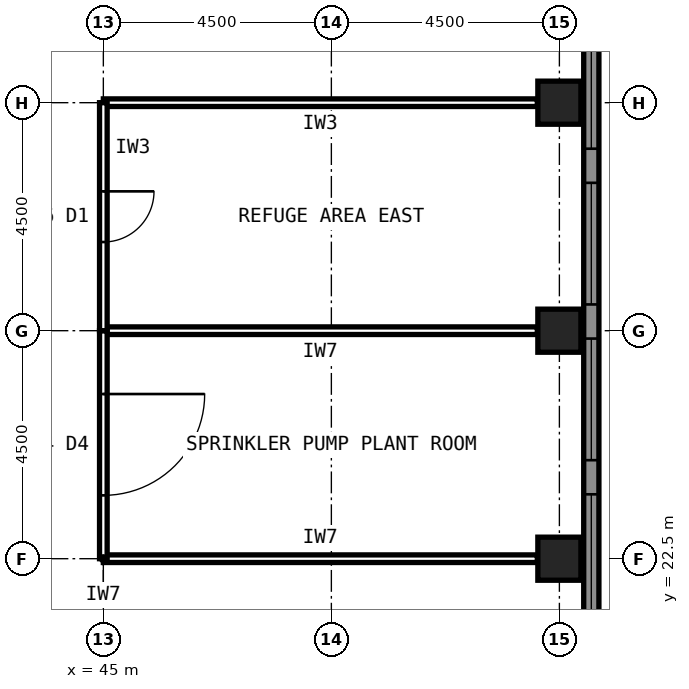
"""IFC4 building model, lengths in metres.
Left out: names, types, materials, properties, quantities, classifications, styles, units other than length and angle.
Written with IfcOpenShell. Run it as: python <this file> out.ifc"""

import sys

from ifc_helpers import new_model, si_unit, direction, frame, frame_2d, origin, origin_2d, place, context, subcontext, project, spatial, rectangle, hollow_rectangle, extrude, element, fill, save


model = new_model("IFC4")
c1 = context("Model", 3, precision=1e-05, world=origin(), true_north=direction((0.0, 1.0)))
c2 = subcontext(c1, "Body", "Model", "MODEL_VIEW")
j1 = project(units=[si_unit("LENGTHUNIT", "METRE"), si_unit("PLANEANGLEUNIT", "RADIAN")], contexts=[c1])
p1 = place(None, origin())
s1 = spatial("IfcSite", under=j1, at=p1, CompositionType="ELEMENT")
p2 = place(p1, origin())
s2 = spatial("IfcBuilding", under=s1, at=p2, CompositionType="ELEMENT")
p3 = place(p2, frame((0.0, 0.0, 104.6)))
s3 = spatial("IfcBuildingStorey", under=s2, at=p3, CompositionType="ELEMENT", Elevation=104.6)
for number, where, z_axis, x_axis in (
    (1, (54.0, 22.5, 0.0), (0.0, 0.0, 1.0), (1.0, 0.0, 0.0)),
    (2, (54.0, 27.0, 0.0), (0.0, 0.0, 1.0), (1.0, 0.0, 0.0)),
    (3, (54.0, 31.5, 0.0), (0.0, 0.0, 1.0), (1.0, 0.0, 0.0)),
):
    element("IfcColumn", number, at=place(p3, frame(where, z_axis=z_axis, x_axis=x_axis)), inside=s3, PredefinedType="COLUMN", context=c2, shape_type="SweptSolid", body=[
        extrude(hollow_rectangle(XDim=0.85, YDim=0.85, WallThickness=0.05, at=origin_2d()), origin(), (0.0, 0.0, 1.0), 6.0),
    ])
p4 = place(p3, frame((54.63, 36.402, 0.0), z_axis=(0.0, 0.0, 1.0), x_axis=(0.0, -1.0, 0.0)))
e4 = element("IfcWall", 4, at=p4, inside=s3, PredefinedType="SOLIDWALL", context=c2, shape_type="SweptSolid", body=[
    extrude(rectangle(XDim=27.663, YDim=0.3, at=frame_2d((13.832, 0.0))), origin(), (0.0, 0.0, 1.0), 6.0),
])
p5 = place(p4, frame((0.337, 0.0, 1.2)))
e5 = element("IfcOpeningElement", 5, at=p5, cuts=e4, PredefinedType="OPENING", context=c2, shape_type="SweptSolid", body=[
    extrude(rectangle(XDim=2.4, YDim=3.0, at=frame_2d((1.2, 1.5))), frame((0.0, 0.16, 0.0), z_axis=(0.0, -1.0, 0.0), x_axis=(1.0, 0.0, 0.0)), (0.0, 0.0, 1.0), 0.32),
])
p6 = place(p4, frame((3.411, 0.0, 1.2)))
e6 = element("IfcOpeningElement", 6, at=p6, cuts=e4, PredefinedType="OPENING", context=c2, shape_type="SweptSolid", body=[
    extrude(rectangle(XDim=2.4, YDim=3.0, at=frame_2d((1.2, 1.5))), frame((0.0, 0.16, 0.0), z_axis=(0.0, -1.0, 0.0), x_axis=(1.0, 0.0, 0.0)), (0.0, 0.0, 1.0), 0.32),
])
p7 = place(p4, frame((6.484, 0.0, 1.2)))
e7 = element("IfcOpeningElement", 7, at=p7, cuts=e4, PredefinedType="OPENING", context=c2, shape_type="SweptSolid", body=[
    extrude(rectangle(XDim=2.4, YDim=3.0, at=frame_2d((1.2, 1.5))), frame((0.0, 0.16, 0.0), z_axis=(0.0, -1.0, 0.0), x_axis=(1.0, 0.0, 0.0)), (0.0, 0.0, 1.0), 0.32),
])
p8 = place(p4, frame((9.558, 0.0, 1.2)))
e8 = element("IfcOpeningElement", 8, at=p8, cuts=e4, PredefinedType="OPENING", context=c2, shape_type="SweptSolid", body=[
    extrude(rectangle(XDim=2.4, YDim=3.0, at=frame_2d((1.2, 1.5))), frame((0.0, 0.16, 0.0), z_axis=(0.0, -1.0, 0.0), x_axis=(1.0, 0.0, 0.0)), (0.0, 0.0, 1.0), 0.32),
])
p9 = place(p4, frame((12.632, 0.0, 1.2)))
e9 = element("IfcOpeningElement", 9, at=p9, cuts=e4, PredefinedType="OPENING", context=c2, shape_type="SweptSolid", body=[
    extrude(rectangle(XDim=2.4, YDim=3.0, at=frame_2d((1.2, 1.5))), frame((0.0, 0.16, 0.0), z_axis=(0.0, -1.0, 0.0), x_axis=(1.0, 0.0, 0.0)), (0.0, 0.0, 1.0), 0.32),
])
p10 = place(p4, frame((15.705, 0.0, 1.2)))
e10 = element("IfcOpeningElement", 10, at=p10, cuts=e4, PredefinedType="OPENING", context=c2, shape_type="SweptSolid", body=[
    extrude(rectangle(XDim=2.4, YDim=3.0, at=frame_2d((1.2, 1.5))), frame((0.0, 0.16, 0.0), z_axis=(0.0, -1.0, 0.0), x_axis=(1.0, 0.0, 0.0)), (0.0, 0.0, 1.0), 0.32),
])
p11 = place(p4, frame((18.779, 0.0, 1.2)))
e11 = element("IfcOpeningElement", 11, at=p11, cuts=e4, PredefinedType="OPENING", context=c2, shape_type="SweptSolid", body=[
    extrude(rectangle(XDim=2.4, YDim=3.0, at=frame_2d((1.2, 1.5))), frame((0.0, 0.16, 0.0), z_axis=(0.0, -1.0, 0.0), x_axis=(1.0, 0.0, 0.0)), (0.0, 0.0, 1.0), 0.32),
])
p12 = place(p4, frame((21.853, 0.0, 1.2)))
e12 = element("IfcOpeningElement", 12, at=p12, cuts=e4, PredefinedType="OPENING", context=c2, shape_type="SweptSolid", body=[
    extrude(rectangle(XDim=2.4, YDim=3.0, at=frame_2d((1.2, 1.5))), frame((0.0, 0.16, 0.0), z_axis=(0.0, -1.0, 0.0), x_axis=(1.0, 0.0, 0.0)), (0.0, 0.0, 1.0), 0.32),
])
p13 = place(p4, frame((24.927, 0.0, 1.2)))
e13 = element("IfcOpeningElement", 13, at=p13, cuts=e4, PredefinedType="OPENING", context=c2, shape_type="SweptSolid", body=[
    extrude(rectangle(XDim=2.4, YDim=3.0, at=frame_2d((1.2, 1.5))), frame((0.0, 0.16, 0.0), z_axis=(0.0, -1.0, 0.0), x_axis=(1.0, 0.0, 0.0)), (0.0, 0.0, 1.0), 0.32),
])
for number, where, z_axis, x_axis in (
    (14, (45.0, 22.5, 0.0), (0.0, 0.0, 1.0), (1.0, 0.0, 0.0)),
    (15, (53.565, 27.0, 0.0), (0.0, 0.0, 1.0), (-1.0, 0.0, 0.0)),
):
    element("IfcWall", number, at=place(p3, frame(where, z_axis=z_axis, x_axis=x_axis)), inside=s3, PredefinedType="PARTITIONING", context=c2, shape_type="SweptSolid", body=[
        extrude(rectangle(XDim=8.565, YDim=0.15, at=frame_2d((4.282, 0.0))), origin(), (0.0, 0.0, 1.0), 4.72),
    ])
p14 = place(p3, frame((45.0, 27.0, 0.0), z_axis=(0.0, 0.0, 1.0), x_axis=(0.0, -1.0, 0.0)))
e16 = element("IfcWall", 16, at=p14, inside=s3, PredefinedType="PARTITIONING", context=c2, shape_type="SweptSolid", body=[
    extrude(rectangle(XDim=4.5, YDim=0.15, at=frame_2d((2.25, 0.0))), origin(), (0.0, 0.0, 1.0), 5.82),
])
p15 = place(p14, frame((1.25, 0.0, 0.0)))
e17 = element("IfcOpeningElement", 17, at=p15, cuts=e16, PredefinedType="OPENING", context=c2, shape_type="SweptSolid", body=[
    extrude(rectangle(XDim=2.0, YDim=2.4, at=frame_2d((1.0, 1.2))), frame((0.0, 0.085, 0.0), z_axis=(0.0, -1.0, 0.0), x_axis=(1.0, 0.0, 0.0)), (0.0, 0.0, 1.0), 0.17),
])
p16 = place(p3, frame((53.565, 31.5, 0.0), z_axis=(0.0, 0.0, 1.0), x_axis=(-1.0, 0.0, 0.0)))
e18 = element("IfcWall", 18, at=p16, inside=s3, PredefinedType="PARTITIONING", context=c2, shape_type="SweptSolid", body=[
    extrude(rectangle(XDim=8.565, YDim=0.15, at=frame_2d((4.282, 0.0))), origin(), (0.0, 0.0, 1.0), 4.72),
])
p17 = place(p3, frame((45.0, 31.5, 0.0), z_axis=(0.0, 0.0, 1.0), x_axis=(0.0, -1.0, 0.0)))
e19 = element("IfcWall", 19, at=p17, inside=s3, PredefinedType="PARTITIONING", context=c2, shape_type="SweptSolid", body=[
    extrude(rectangle(XDim=4.5, YDim=0.15, at=frame_2d((2.25, 0.0))), origin(), (0.0, 0.0, 1.0), 5.82),
])
p18 = place(p17, frame((1.75, 0.0, 0.0)))
e20 = element("IfcOpeningElement", 20, at=p18, cuts=e19, PredefinedType="OPENING", context=c2, shape_type="SweptSolid", body=[
    extrude(rectangle(XDim=1.0, YDim=2.1, at=frame_2d((0.5, 1.05))), frame((0.0, 0.085, 0.0), z_axis=(0.0, -1.0, 0.0), x_axis=(1.0, 0.0, 0.0)), (0.0, 0.0, 1.0), 0.17),
])
p19 = place(p6, origin())
e21 = element("IfcWindow", 21, at=p19, inside=s3, PartitioningType="SINGLE_PANEL", PredefinedType="USERDEFINED", context=c2, shape_type="SweptSolid", body=[
    extrude(rectangle(XDim=2.4, YDim=3.0, at=frame_2d((1.2, 1.5))), frame((0.0, 0.03, 0.0), z_axis=(0.0, -1.0, 0.0), x_axis=(1.0, 0.0, 0.0)), (0.0, 0.0, 1.0), 0.06),
])
fill(e6, e21)
p20 = place(p7, origin())
e22 = element("IfcWindow", 22, at=p20, inside=s3, PartitioningType="SINGLE_PANEL", PredefinedType="USERDEFINED", context=c2, shape_type="SweptSolid", body=[
    extrude(rectangle(XDim=2.4, YDim=3.0, at=frame_2d((1.2, 1.5))), frame((0.0, 0.03, 0.0), z_axis=(0.0, -1.0, 0.0), x_axis=(1.0, 0.0, 0.0)), (0.0, 0.0, 1.0), 0.06),
])
fill(e7, e22)
p21 = place(p8, origin())
e23 = element("IfcWindow", 23, at=p21, inside=s3, PartitioningType="SINGLE_PANEL", PredefinedType="USERDEFINED", context=c2, shape_type="SweptSolid", body=[
    extrude(rectangle(XDim=2.4, YDim=3.0, at=frame_2d((1.2, 1.5))), frame((0.0, 0.03, 0.0), z_axis=(0.0, -1.0, 0.0), x_axis=(1.0, 0.0, 0.0)), (0.0, 0.0, 1.0), 0.06),
])
fill(e8, e23)
p22 = place(p9, origin())
e24 = element("IfcWindow", 24, at=p22, inside=s3, PartitioningType="SINGLE_PANEL", PredefinedType="USERDEFINED", context=c2, shape_type="SweptSolid", body=[
    extrude(rectangle(XDim=2.4, YDim=3.0, at=frame_2d((1.2, 1.5))), frame((0.0, 0.03, 0.0), z_axis=(0.0, -1.0, 0.0), x_axis=(1.0, 0.0, 0.0)), (0.0, 0.0, 1.0), 0.06),
])
fill(e9, e24)
p23 = place(p15, origin())
e25 = element("IfcDoor", 25, at=p23, inside=s3, OperationType="SINGLE_SWING_LEFT", PredefinedType="DOOR", context=c2, shape_type="SweptSolid", body=[
    extrude(rectangle(XDim=2.0, YDim=2.4, at=frame_2d((1.0, 1.2))), frame((0.0, 0.025, 0.0), z_axis=(0.0, -1.0, 0.0), x_axis=(1.0, 0.0, 0.0)), (0.0, 0.0, 1.0), 0.05),
])
fill(e17, e25)
p24 = place(p18, origin())
e26 = element("IfcDoor", 26, at=p24, inside=s3, OperationType="SINGLE_SWING_LEFT", PredefinedType="DOOR", context=c2, shape_type="SweptSolid", body=[
    extrude(rectangle(XDim=1.0, YDim=2.1, at=frame_2d((0.5, 1.05))), frame((0.0, 0.025, 0.0), z_axis=(0.0, -1.0, 0.0), x_axis=(1.0, 0.0, 0.0)), (0.0, 0.0, 1.0), 0.05),
])
fill(e20, e26)
save(model, sys.argv[1])
